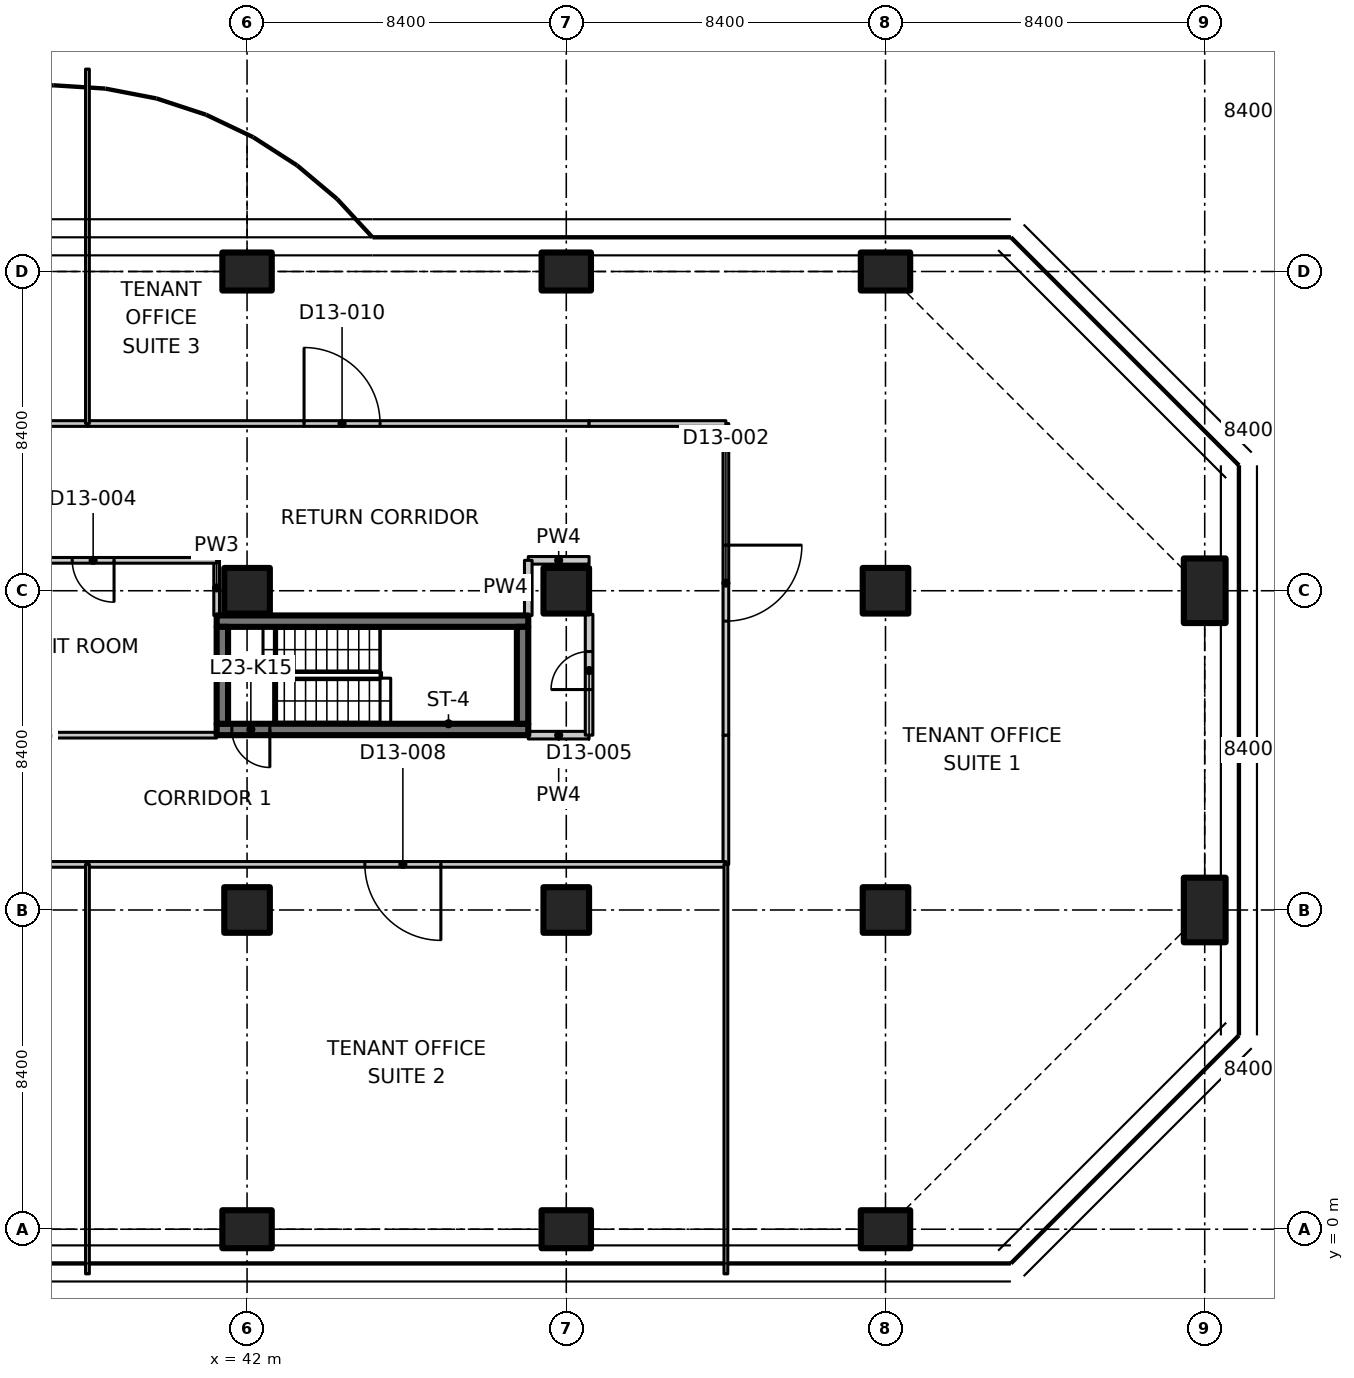
"""IFC4 building model, lengths in metres.
Left out: names, types, materials, properties, quantities, classifications, styles, units other than length and angle.
Written with IfcOpenShell. Run it as: python <this file> out.ifc"""

import sys

from ifc_helpers import new_model, si_unit, direction, frame, frame_2d, origin, origin_2d, place, context, subcontext, project, spatial, polyline, rectangle, outline, extrude, element, fill, save


model = new_model("IFC4")
c1 = context("Model", 3, precision=1e-05, world=origin(), true_north=direction((0.0, 1.0)))
c2 = subcontext(c1, "Body", "Model", "MODEL_VIEW")
j1 = project(units=[si_unit("LENGTHUNIT", "METRE"), si_unit("PLANEANGLEUNIT", "RADIAN")], contexts=[c1])
p1 = place(None, origin())
s1 = spatial("IfcSite", under=j1, at=p1, CompositionType="ELEMENT")
p2 = place(p1, origin())
s2 = spatial("IfcBuilding", under=s1, at=p2, CompositionType="ELEMENT")
p3 = place(p2, frame((0.0, 0.0, 98.9)))
s3 = spatial("IfcBuildingStorey", under=s2, at=p3, CompositionType="ELEMENT", Elevation=98.9)
p4 = place(p3, frame((42.0, 0.0, 0.0), z_axis=(0.0, 0.0, 1.0), x_axis=(0.0, 1.0, 0.0)))
e1 = element("IfcColumn", 1, at=p4, inside=s3, PredefinedType="COLUMN", context=c2, shape_type="SweptSolid", body=[
    extrude(rectangle(XDim=1.0, YDim=1.3, at=origin_2d()), origin(), (0.0, 0.0, 1.0), 3.35),
])
for number, where, z_axis, x_axis in (
    (2, (42.0, 8.4, 0.0), (0.0, 0.0, 1.0), (1.0, 0.0, 0.0)),
    (3, (42.0, 16.8, 0.0), (0.0, 0.0, 1.0), (1.0, 0.0, 0.0)),
):
    element("IfcColumn", number, at=place(p3, frame(where, z_axis=z_axis, x_axis=x_axis)), inside=s3, PredefinedType="COLUMN", context=c2, shape_type="SweptSolid", body=[
        extrude(rectangle(XDim=1.2, YDim=1.2, at=origin_2d()), origin(), (0.0, 0.0, 1.0), 3.35),
    ])
for number, where, z_axis, x_axis in (
    (4, (42.0, 25.2, 0.0), (0.0, 0.0, 1.0), (0.0, 1.0, 0.0)),
    (5, (50.4, 0.0, 0.0), (0.0, 0.0, 1.0), (0.0, 1.0, 0.0)),
):
    element("IfcColumn", number, at=place(p3, frame(where, z_axis=z_axis, x_axis=x_axis)), inside=s3, PredefinedType="COLUMN", context=c2, shape_type="SweptSolid", body=[
        extrude(rectangle(XDim=1.0, YDim=1.3, at=origin_2d()), origin(), (0.0, 0.0, 1.0), 3.35),
    ])
for number, where, z_axis, x_axis in (
    (6, (50.4, 8.4, 0.0), (0.0, 0.0, 1.0), (1.0, 0.0, 0.0)),
    (7, (50.4, 16.8, 0.0), (0.0, 0.0, 1.0), (1.0, 0.0, 0.0)),
):
    element("IfcColumn", number, at=place(p3, frame(where, z_axis=z_axis, x_axis=x_axis)), inside=s3, PredefinedType="COLUMN", context=c2, shape_type="SweptSolid", body=[
        extrude(rectangle(XDim=1.2, YDim=1.2, at=origin_2d()), origin(), (0.0, 0.0, 1.0), 3.35),
    ])
for number, where, z_axis, x_axis in (
    (8, (50.4, 25.2, 0.0), (0.0, 0.0, 1.0), (0.0, 1.0, 0.0)),
    (9, (58.8, 0.0, 0.0), (0.0, 0.0, 1.0), (0.0, 1.0, 0.0)),
):
    element("IfcColumn", number, at=place(p3, frame(where, z_axis=z_axis, x_axis=x_axis)), inside=s3, PredefinedType="COLUMN", context=c2, shape_type="SweptSolid", body=[
        extrude(rectangle(XDim=1.0, YDim=1.3, at=origin_2d()), origin(), (0.0, 0.0, 1.0), 3.35),
    ])
for number, where, z_axis, x_axis in (
    (10, (58.8, 8.4, 0.0), (0.0, 0.0, 1.0), (1.0, 0.0, 0.0)),
    (11, (58.8, 16.8, 0.0), (0.0, 0.0, 1.0), (1.0, 0.0, 0.0)),
):
    element("IfcColumn", number, at=place(p3, frame(where, z_axis=z_axis, x_axis=x_axis)), inside=s3, PredefinedType="COLUMN", context=c2, shape_type="SweptSolid", body=[
        extrude(rectangle(XDim=1.2, YDim=1.2, at=origin_2d()), origin(), (0.0, 0.0, 1.0), 3.35),
    ])
p5 = place(p3, frame((58.8, 25.2, 0.0), z_axis=(0.0, 0.0, 1.0), x_axis=(0.0, 1.0, 0.0)))
e12 = element("IfcColumn", 12, at=p5, inside=s3, PredefinedType="COLUMN", context=c2, shape_type="SweptSolid", body=[
    extrude(rectangle(XDim=1.0, YDim=1.3, at=origin_2d()), origin(), (0.0, 0.0, 1.0), 3.35),
])
for number, where, z_axis, x_axis in (
    (13, (67.2, 8.4, 0.0), (0.0, 0.0, 1.0), (1.0, 0.0, 0.0)),
    (14, (67.2, 16.8, 0.0), (0.0, 0.0, 1.0), (1.0, 0.0, 0.0)),
):
    element("IfcColumn", number, at=place(p3, frame(where, z_axis=z_axis, x_axis=x_axis)), inside=s3, PredefinedType="COLUMN", context=c2, shape_type="SweptSolid", body=[
        extrude(rectangle(XDim=1.1, YDim=1.7, at=origin_2d()), origin(), (0.0, 0.0, 1.0), 3.35),
    ])
p6 = place(p3, frame((49.4, 13.15, 0.0), z_axis=(0.0, 0.0, 1.0), x_axis=(-1.0, 0.0, 0.0)))
e15 = element("IfcWall", 15, at=p6, inside=s3, PredefinedType="SHEAR", context=c2, shape_type="SweptSolid", body=[
    extrude(rectangle(XDim=8.2, YDim=0.3, at=frame_2d((4.1, 0.0))), origin(), (0.0, 0.0, 1.0), 3.35),
])
p7 = place(p6, frame((6.8, 0.0, 0.0)))
e16 = element("IfcOpeningElement", 16, at=p7, cuts=e15, PredefinedType="OPENING", context=c2, shape_type="SweptSolid", body=[
    extrude(rectangle(XDim=1.0, YDim=2.1, at=frame_2d((0.5, 1.05))), frame((0.0, 0.16, 0.0), z_axis=(0.0, -1.0, 0.0), x_axis=(1.0, 0.0, 0.0)), (0.0, 0.0, 1.0), 0.32),
])
p8 = place(p3, frame((41.2, 16.0, 0.0), z_axis=(0.0, 0.0, 1.0), x_axis=(1.0, 0.0, 0.0)))
e17 = element("IfcWall", 17, at=p8, inside=s3, PredefinedType="SHEAR", context=c2, shape_type="SweptSolid", body=[
    extrude(rectangle(XDim=8.2, YDim=0.3, at=frame_2d((4.1, 0.0))), origin(), (0.0, 0.0, 1.0), 3.35),
])
for number, where, z_axis, x_axis in (
    (18, (41.35, 13.3, 0.0), (0.0, 0.0, 1.0), (0.0, 1.0, 0.0)),
    (19, (49.25, 13.3, 0.0), (0.0, 0.0, 1.0), (0.0, 1.0, 0.0)),
):
    element("IfcWall", number, at=place(p3, frame(where, z_axis=z_axis, x_axis=x_axis)), inside=s3, PredefinedType="SHEAR", context=c2, shape_type="SweptSolid", body=[
        extrude(rectangle(XDim=2.55, YDim=0.3, at=frame_2d((1.275, 0.0))), origin(), (0.0, 0.0, 1.0), 3.35),
    ])
p9 = place(p3, frame((54.6, 13.0, 0.0), z_axis=(0.0, 0.0, 1.0), x_axis=(0.0, -1.0, 0.0)))
e20 = element("IfcWall", 20, at=p9, inside=s3, PredefinedType="PARTITIONING", context=c2, shape_type="SweptSolid", body=[
    extrude(rectangle(XDim=3.4, YDim=0.15, at=frame_2d((1.7, 0.0))), origin(), (0.0, 0.0, 1.0), 3.33),
])
p10 = place(p3, frame((34.8, 13.0, 0.0), z_axis=(0.0, 0.0, 1.0), x_axis=(1.0, 0.0, 0.0)))
e21 = element("IfcWall", 21, at=p10, inside=s3, PredefinedType="PARTITIONING", context=c2, shape_type="SweptSolid", body=[
    extrude(rectangle(XDim=6.4, YDim=0.15, at=frame_2d((3.2, 0.0))), origin(), (0.0, 0.0, 1.0), 3.33),
])
p11 = place(p3, frame((49.4, 13.0, 0.0), z_axis=(0.0, 0.0, 1.0), x_axis=(1.0, 0.0, 0.0)))
e22 = element("IfcWall", 22, at=p11, inside=s3, PredefinedType="PARTITIONING", context=c2, shape_type="SweptSolid", body=[
    extrude(rectangle(XDim=1.6, YDim=0.2, at=frame_2d((0.8, 0.0))), origin(), (0.0, 0.0, 1.0), 3.33),
])
p12 = place(p3, frame((37.8, 9.6, 0.0), z_axis=(0.0, 0.0, 1.0), x_axis=(-1.0, 0.0, 0.0)))
e23 = element("IfcWall", 23, at=p12, inside=s3, PredefinedType="PARTITIONING", context=c2, shape_type="SweptSolid", body=[
    extrude(rectangle(XDim=4.2, YDim=0.15, at=frame_2d((2.1, 0.0))), origin(), (0.0, 0.0, 1.0), 3.33),
])
p13 = place(p12, frame((1.5, 0.0, 0.0)))
e24 = element("IfcOpeningElement", 24, at=p13, cuts=e23, PredefinedType="OPENING", context=c2, shape_type="SweptSolid", body=[
    extrude(rectangle(XDim=1.1, YDim=2.1, at=frame_2d((0.55, 1.05))), frame((0.0, 0.085, 0.0), z_axis=(0.0, -1.0, 0.0), x_axis=(1.0, 0.0, 0.0)), (0.0, 0.0, 1.0), 0.17),
])
p14 = place(p3, frame((54.6, 9.6, 0.0), z_axis=(0.0, 0.0, 1.0), x_axis=(-1.0, 0.0, 0.0)))
e25 = element("IfcWall", 25, at=p14, inside=s3, PredefinedType="PARTITIONING", context=c2, shape_type="SweptSolid", body=[
    extrude(rectangle(XDim=16.8, YDim=0.15, at=frame_2d((8.4, 0.0))), origin(), (0.0, 0.0, 1.0), 3.33),
])
p15 = place(p14, frame((7.5, 0.0, 0.0)))
e26 = element("IfcOpeningElement", 26, at=p15, cuts=e25, PredefinedType="OPENING", context=c2, shape_type="SweptSolid", body=[
    extrude(rectangle(XDim=2.0, YDim=2.4, at=frame_2d((1.0, 1.2))), frame((0.0, 0.085, 0.0), z_axis=(0.0, -1.0, 0.0), x_axis=(1.0, 0.0, 0.0)), (0.0, 0.0, 1.0), 0.17),
])
p16 = place(p3, frame((54.6, 21.2, 0.0), z_axis=(0.0, 0.0, 1.0), x_axis=(0.0, -1.0, 0.0)))
e27 = element("IfcWall", 27, at=p16, inside=s3, PredefinedType="PARTITIONING", context=c2, shape_type="SweptSolid", body=[
    extrude(rectangle(XDim=8.2, YDim=0.15, at=frame_2d((4.1, 0.0))), origin(), (0.0, 0.0, 1.0), 3.33),
])
p17 = place(p16, frame((3.2, 0.0, 0.0)))
e28 = element("IfcOpeningElement", 28, at=p17, cuts=e27, PredefinedType="OPENING", context=c2, shape_type="SweptSolid", body=[
    extrude(rectangle(XDim=2.0, YDim=2.4, at=frame_2d((1.0, 1.2))), frame((0.0, 0.085, 0.0), z_axis=(0.0, -1.0, 0.0), x_axis=(1.0, 0.0, 0.0)), (0.0, 0.0, 1.0), 0.17),
])
p18 = place(p3, frame((54.6, -1.174, 0.0), z_axis=(0.0, 0.0, 1.0), x_axis=(0.0, 1.0, 0.0)))
e29 = element("IfcWall", 29, at=p18, inside=s3, PredefinedType="PARTITIONING", context=c2, shape_type="SweptSolid", body=[
    extrude(outline(polyline([(0.0, 0.0), (10.774, 0.0), (10.774, 3.33), (1.624, 3.33), (1.622, 2.98), (0.726, 2.98), (0.724, 3.33), (0.074, 3.33), (0.0, 3.33), (0.0, 0.0)])), frame((0.0, 0.05, 0.0), z_axis=(0.0, -1.0, 0.0), x_axis=(1.0, 0.0, 0.0)), (0.0, 0.0, 1.0), 0.1),
])
p19 = place(p3, frame((41.2, 16.15, 0.0), z_axis=(0.0, 0.0, 1.0), x_axis=(0.0, 1.0, 0.0)))
e30 = element("IfcWall", 30, at=p19, inside=s3, PredefinedType="PARTITIONING", context=c2, shape_type="SweptSolid", body=[
    extrude(rectangle(XDim=1.45, YDim=0.15, at=frame_2d((0.725, 0.0))), origin(), (0.0, 0.0, 1.0), 3.33),
])
p20 = place(p3, frame((41.2, 17.6, 0.0), z_axis=(0.0, 0.0, 1.0), x_axis=(-1.0, 0.0, 0.0)))
e31 = element("IfcWall", 31, at=p20, inside=s3, PredefinedType="PARTITIONING", context=c2, shape_type="SweptSolid", body=[
    extrude(rectangle(XDim=6.4, YDim=0.15, at=frame_2d((3.2, 0.0))), origin(), (0.0, 0.0, 1.0), 3.33),
])
p21 = place(p20, frame((2.7, 0.0, 0.0)))
e32 = element("IfcOpeningElement", 32, at=p21, cuts=e31, PredefinedType="OPENING", context=c2, shape_type="SweptSolid", body=[
    extrude(rectangle(XDim=1.1, YDim=2.1, at=frame_2d((0.55, 1.05))), frame((0.0, 0.085, 0.0), z_axis=(0.0, -1.0, 0.0), x_axis=(1.0, 0.0, 0.0)), (0.0, 0.0, 1.0), 0.17),
])
p22 = place(p3, frame((51.0, 17.6, 0.0), z_axis=(0.0, 0.0, 1.0), x_axis=(-1.0, 0.0, 0.0)))
e33 = element("IfcWall", 33, at=p22, inside=s3, PredefinedType="PARTITIONING", context=c2, shape_type="SweptSolid", body=[
    extrude(rectangle(XDim=1.6, YDim=0.2, at=frame_2d((0.8, 0.0))), origin(), (0.0, 0.0, 1.0), 3.33),
])
p23 = place(p3, frame((49.4, 17.6, 0.0), z_axis=(0.0, 0.0, 1.0), x_axis=(0.0, -1.0, 0.0)))
e34 = element("IfcWall", 34, at=p23, inside=s3, PredefinedType="PARTITIONING", context=c2, shape_type="SweptSolid", body=[
    extrude(rectangle(XDim=1.45, YDim=0.2, at=frame_2d((0.725, 0.0))), origin(), (0.0, 0.0, 1.0), 3.33),
])
p24 = place(p3, frame((29.4, 21.2, 0.0), z_axis=(0.0, 0.0, 1.0), x_axis=(1.0, 0.0, 0.0)))
e35 = element("IfcWall", 35, at=p24, inside=s3, PredefinedType="PARTITIONING", context=c2, shape_type="SweptSolid", body=[
    extrude(rectangle(XDim=8.4, YDim=0.15, at=frame_2d((4.2, 0.0))), origin(), (0.0, 0.0, 1.0), 3.33),
])
p25 = place(p24, frame((3.3, 0.0, 0.0)))
e36 = element("IfcOpeningElement", 36, at=p25, cuts=e35, PredefinedType="OPENING", context=c2, shape_type="SweptSolid", body=[
    extrude(rectangle(XDim=1.6, YDim=2.1, at=frame_2d((0.8, 1.05))), frame((0.0, 0.085, 0.0), z_axis=(0.0, -1.0, 0.0), x_axis=(1.0, 0.0, 0.0)), (0.0, 0.0, 1.0), 0.17),
])
p26 = place(p3, frame((37.8, 21.2, 0.0), z_axis=(0.0, 0.0, 1.0), x_axis=(1.0, 0.0, 0.0)))
e37 = element("IfcWall", 37, at=p26, inside=s3, PredefinedType="PARTITIONING", context=c2, shape_type="SweptSolid", body=[
    extrude(rectangle(XDim=13.2, YDim=0.15, at=frame_2d((6.6, 0.0))), origin(), (0.0, 0.0, 1.0), 3.33),
])
p27 = place(p26, frame((5.7, 0.0, 0.0)))
e38 = element("IfcOpeningElement", 38, at=p27, cuts=e37, PredefinedType="OPENING", context=c2, shape_type="SweptSolid", body=[
    extrude(rectangle(XDim=2.0, YDim=2.4, at=frame_2d((1.0, 1.2))), frame((0.0, 0.085, 0.0), z_axis=(0.0, -1.0, 0.0), x_axis=(1.0, 0.0, 0.0)), (0.0, 0.0, 1.0), 0.17),
])
p28 = place(p3, frame((51.0, 13.0, 0.0), z_axis=(0.0, 0.0, 1.0), x_axis=(0.0, 1.0, 0.0)))
e39 = element("IfcWall", 39, at=p28, inside=s3, PredefinedType="PARTITIONING", context=c2, shape_type="SweptSolid", body=[
    extrude(rectangle(XDim=3.18, YDim=0.2, at=frame_2d((1.59, 0.0))), origin(), (0.0, 0.0, 1.0), 3.33),
])
p29 = place(p28, frame((1.2, 0.0, 0.0)))
e40 = element("IfcOpeningElement", 40, at=p29, cuts=e39, PredefinedType="OPENING", context=c2, shape_type="SweptSolid", body=[
    extrude(rectangle(XDim=1.0, YDim=2.1, at=frame_2d((0.5, 1.05))), frame((0.0, 0.11, 0.0), z_axis=(0.0, -1.0, 0.0), x_axis=(1.0, 0.0, 0.0)), (0.0, 0.0, 1.0), 0.22),
])
p30 = place(p3, frame((51.0, 21.2, 0.0), z_axis=(0.0, 0.0, 1.0), x_axis=(1.0, 0.0, 0.0)))
e41 = element("IfcWall", 41, at=p30, inside=s3, PredefinedType="PARTITIONING", context=c2, shape_type="SweptSolid", body=[
    extrude(rectangle(XDim=3.6, YDim=0.15, at=frame_2d((1.8, 0.0))), origin(), (0.0, 0.0, 1.0), 3.33),
])
p31 = place(p3, frame((37.8, 9.6, 0.0), z_axis=(0.0, 0.0, 1.0), x_axis=(0.0, -1.0, 0.0)))
e42 = element("IfcWall", 42, at=p31, inside=s3, PredefinedType="PARTITIONING", context=c2, shape_type="SweptSolid", body=[
    extrude(outline(polyline([(0.0, 0.0), (10.774, 0.0), (10.774, 3.33), (10.7, 3.33), (10.05, 3.33), (10.048, 2.98), (9.152, 2.98), (9.15, 3.33), (0.0, 3.33), (0.0, 0.0)])), frame((0.0, 0.05, 0.0), z_axis=(0.0, -1.0, 0.0), x_axis=(1.0, 0.0, 0.0)), (0.0, 0.0, 1.0), 0.1),
])
p32 = place(p3, frame((37.8, 30.526, 0.0), z_axis=(0.0, 0.0, 1.0), x_axis=(0.0, -1.0, 0.0)))
e43 = element("IfcWall", 43, at=p32, inside=s3, PredefinedType="PARTITIONING", context=c2, shape_type="SweptSolid", body=[
    extrude(outline(polyline([(0.0, 0.0), (9.326, 0.0), (9.326, 3.33), (5.776, 3.33), (5.774, 2.98), (4.878, 2.98), (4.876, 3.33), (0.283, 3.33), (0.0, 3.33), (0.0, 0.0)])), frame((0.0, 0.05, 0.0), z_axis=(0.0, -1.0, 0.0), x_axis=(1.0, 0.0, 0.0)), (0.0, 0.0, 1.0), 0.1),
])
p33 = place(p7, origin())
e44 = element("IfcDoor", 44, at=p33, inside=s3, OperationType="SINGLE_SWING_LEFT", PredefinedType="DOOR", context=c2, shape_type="SweptSolid", body=[
    extrude(rectangle(XDim=1.0, YDim=2.1, at=frame_2d((0.5, 1.05))), frame((0.0, 0.025, 0.0), z_axis=(0.0, -1.0, 0.0), x_axis=(1.0, 0.0, 0.0)), (0.0, 0.0, 1.0), 0.05),
])
fill(e16, e44)
p34 = place(p17, origin())
e45 = element("IfcDoor", 45, at=p34, inside=s3, OperationType="DOUBLE_DOOR_SINGLE_SWING", PredefinedType="DOOR", context=c2, shape_type="SweptSolid", body=[
    extrude(rectangle(XDim=2.0, YDim=2.4, at=frame_2d((1.0, 1.2))), frame((0.0, 0.025, 0.0), z_axis=(0.0, -1.0, 0.0), x_axis=(1.0, 0.0, 0.0)), (0.0, 0.0, 1.0), 0.05),
])
fill(e28, e45)
p35 = place(p21, origin())
e46 = element("IfcDoor", 46, at=p35, inside=s3, OperationType="SINGLE_SWING_LEFT", PredefinedType="DOOR", context=c2, shape_type="SweptSolid", body=[
    extrude(rectangle(XDim=1.1, YDim=2.1, at=frame_2d((0.55, 1.05))), frame((0.0, 0.025, 0.0), z_axis=(0.0, -1.0, 0.0), x_axis=(1.0, 0.0, 0.0)), (0.0, 0.0, 1.0), 0.05),
])
fill(e32, e46)
p36 = place(p29, origin())
e47 = element("IfcDoor", 47, at=p36, inside=s3, OperationType="SINGLE_SWING_LEFT", PredefinedType="DOOR", context=c2, shape_type="SweptSolid", body=[
    extrude(rectangle(XDim=1.0, YDim=2.1, at=frame_2d((0.5, 1.05))), frame((0.0, 0.025, 0.0), z_axis=(0.0, -1.0, 0.0), x_axis=(1.0, 0.0, 0.0)), (0.0, 0.0, 1.0), 0.05),
])
fill(e40, e47)
p37 = place(p15, origin())
e48 = element("IfcDoor", 48, at=p37, inside=s3, OperationType="DOUBLE_DOOR_SINGLE_SWING", PredefinedType="DOOR", context=c2, shape_type="SweptSolid", body=[
    extrude(rectangle(XDim=2.0, YDim=2.4, at=frame_2d((1.0, 1.2))), frame((0.0, 0.025, 0.0), z_axis=(0.0, -1.0, 0.0), x_axis=(1.0, 0.0, 0.0)), (0.0, 0.0, 1.0), 0.05),
])
fill(e26, e48)
p38 = place(p27, origin())
e49 = element("IfcDoor", 49, at=p38, inside=s3, OperationType="DOUBLE_DOOR_SINGLE_SWING", PredefinedType="DOOR", context=c2, shape_type="SweptSolid", body=[
    extrude(rectangle(XDim=2.0, YDim=2.4, at=frame_2d((1.0, 1.2))), frame((0.0, 0.025, 0.0), z_axis=(0.0, -1.0, 0.0), x_axis=(1.0, 0.0, 0.0)), (0.0, 0.0, 1.0), 0.05),
])
fill(e38, e49)
save(model, sys.argv[1])
